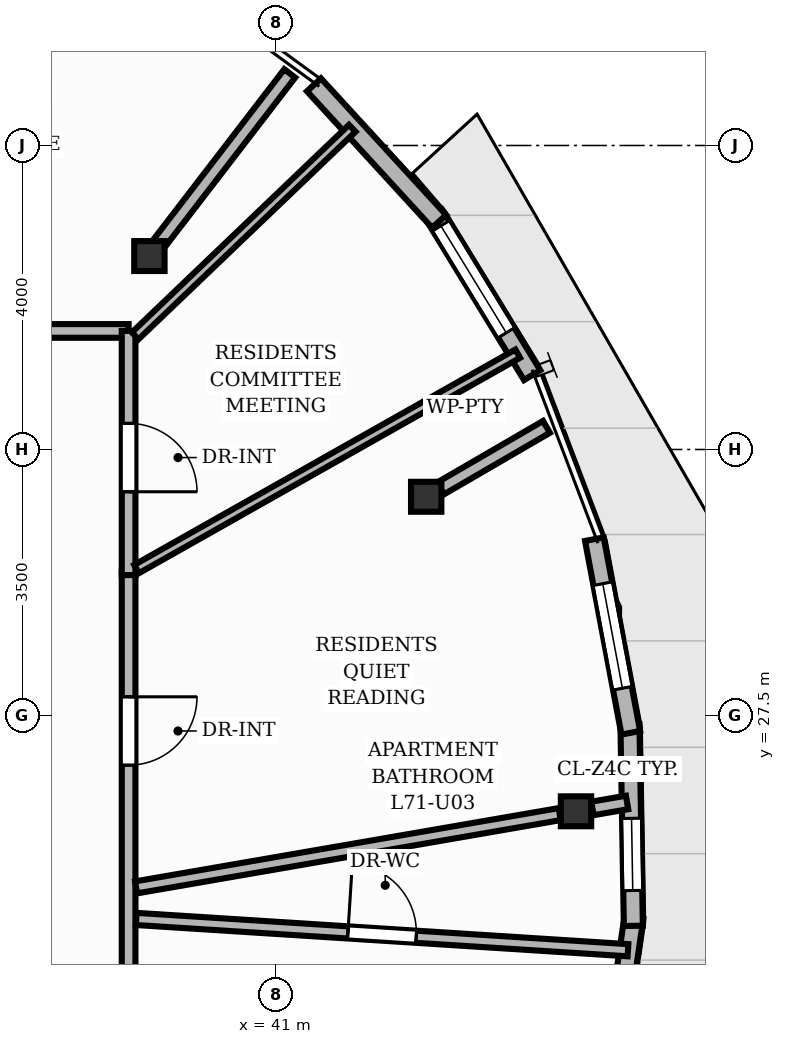
"""IFC4 building model, lengths in metres.
Left out: names, types, materials, properties, quantities, classifications, styles, units other than length and angle.
Written with IfcOpenShell. Run it as: python <this file> out.ifc"""

import sys

from ifc_helpers import new_model, si_unit, direction, frame, frame_2d, origin, origin_2d, place, context, subcontext, project, spatial, rectangle, i_section, extrude, element, fill, save


model = new_model("IFC4")
c1 = context("Model", 3, precision=1e-05, world=origin(), true_north=direction((0.0, 1.0)))
c2 = subcontext(c1, "Body", "Model", "MODEL_VIEW")
j1 = project(units=[si_unit("LENGTHUNIT", "METRE"), si_unit("PLANEANGLEUNIT", "RADIAN")], contexts=[c1])
p1 = place(None, origin())
s1 = spatial("IfcSite", under=j1, at=p1, CompositionType="ELEMENT")
p2 = place(p1, origin())
s2 = spatial("IfcBuilding", under=s1, at=p2, CompositionType="ELEMENT")
p3 = place(p2, frame((0.0, 0.0, 236.64)))
s3 = spatial("IfcBuildingStorey", under=s2, at=p3, CompositionType="ELEMENT", Elevation=236.64)
for number, where, z_axis, x_axis in (
    (1, (44.946, 26.24, 0.0), (0.0, 0.0, 1.0), (1.0, 0.0, 0.0)),
    (2, (42.975, 30.378, 0.0), (0.0, 0.0, 1.0), (1.0, 0.0, 0.0)),
    (3, (39.333, 33.545, 0.0), (0.0, 0.0, 1.0), (1.0, 0.0, 0.0)),
):
    element("IfcColumn", number, at=place(p3, frame(where, z_axis=z_axis, x_axis=x_axis)), inside=s3, PredefinedType="COLUMN", context=c2, shape_type="SweptSolid", body=[
        extrude(i_section(OverallWidth=0.399, OverallDepth=0.394, WebThickness=0.023, FlangeThickness=0.037, at=origin_2d()), origin(), (0.0, 0.0, 1.0), 3.2),
    ])
p4 = place(p3, frame((45.708, 24.842, 0.0), z_axis=(0.0, 0.0, 1.0), x_axis=(-0.144229466115, -0.989544269401, 0.0)))
e4 = element("IfcWall", 4, at=p4, inside=s3, PredefinedType="SOLIDWALL", context=c2, shape_type="SweptSolid", body=[
    extrude(rectangle(XDim=2.702, YDim=0.25, at=frame_2d((1.351, 0.0))), origin(), (0.0, 0.0, 1.0), 2.577),
])
p5 = place(p4, frame((0.651, 0.0, 0.85)))
e5 = element("IfcOpeningElement", 5, at=p5, cuts=e4, PredefinedType="OPENING", context=c2, shape_type="SweptSolid", body=[
    extrude(rectangle(XDim=1.4, YDim=1.55, at=frame_2d((0.7, 0.775))), frame((0.0, 0.135, 0.0), z_axis=(0.0, -1.0, 0.0), x_axis=(1.0, 0.0, 0.0)), (0.0, 0.0, 1.0), 0.27),
])
p6 = place(p3, frame((45.656, 27.383, 0.0), z_axis=(0.0, 0.0, 1.0), x_axis=(0.016945158089, -0.999856420501, 0.0)))
e6 = element("IfcWall", 6, at=p6, inside=s3, PredefinedType="SOLIDWALL", context=c2, shape_type="SweptSolid", body=[
    extrude(rectangle(XDim=2.651, YDim=0.25, at=frame_2d((1.326, 0.0))), origin(), (0.0, 0.0, 1.0), 2.96),
])
p7 = place(p6, frame((1.236, 0.0, 0.85)))
e7 = element("IfcOpeningElement", 7, at=p7, cuts=e6, PredefinedType="OPENING", context=c2, shape_type="SweptSolid", body=[
    extrude(rectangle(XDim=0.95, YDim=1.45, at=frame_2d((0.475, 0.725))), frame((0.0, 0.135, 0.0), z_axis=(0.0, -1.0, 0.0), x_axis=(1.0, 0.0, 0.0)), (0.0, 0.0, 1.0), 0.27),
])
p8 = place(p3, frame((45.188, 29.82, 0.0), z_axis=(0.0, 0.0, 1.0), x_axis=(0.184783228791, -0.982779302976, 0.0)))
e8 = element("IfcWall", 8, at=p8, inside=s3, PredefinedType="SOLIDWALL", context=c2, shape_type="SweptSolid", body=[
    extrude(rectangle(XDim=2.592, YDim=0.25, at=frame_2d((1.296, 0.0))), origin(), (0.0, 0.0, 1.0), 2.96),
])
p9 = place(p8, frame((0.596, 0.0, 0.85)))
e9 = element("IfcOpeningElement", 9, at=p9, cuts=e8, PredefinedType="OPENING", context=c2, shape_type="SweptSolid", body=[
    extrude(rectangle(XDim=1.4, YDim=1.55, at=frame_2d((0.7, 0.775))), frame((0.0, 0.135, 0.0), z_axis=(0.0, -1.0, 0.0), x_axis=(1.0, 0.0, 0.0)), (0.0, 0.0, 1.0), 0.27),
])
p10 = place(p3, frame((43.077, 34.093, 0.0), z_axis=(0.0, 0.0, 1.0), x_axis=(0.52150580366, -0.853247734687, 0.0)))
e10 = element("IfcWall", 10, at=p10, inside=s3, PredefinedType="SOLIDWALL", context=c2, shape_type="SweptSolid", body=[
    extrude(rectangle(XDim=2.478, YDim=0.25, at=frame_2d((1.239, 0.0))), origin(), (0.0, 0.0, 1.0), 2.96),
])
p11 = place(p10, frame((0.175, 0.0, 0.85)))
e11 = element("IfcOpeningElement", 11, at=p11, cuts=e10, PredefinedType="OPENING", context=c2, shape_type="SweptSolid", body=[
    extrude(rectangle(XDim=1.65, YDim=1.55, at=frame_2d((0.825, 0.775))), frame((0.0, 0.135, 0.0), z_axis=(0.0, -1.0, 0.0), x_axis=(1.0, 0.0, 0.0)), (0.0, 0.0, 1.0), 0.27),
])
p12 = place(p3, frame((41.499, 35.798, 0.0), z_axis=(0.0, 0.0, 1.0), x_axis=(0.675783606308, -0.737100072884, 0.0)))
e12 = element("IfcWall", 12, at=p12, inside=s3, PredefinedType="SOLIDWALL", context=c2, shape_type="SweptSolid", body=[
    extrude(rectangle(XDim=2.437, YDim=0.25, at=frame_2d((1.218, 0.0))), origin(), (0.0, 0.0, 1.0), 2.96),
])
p13 = place(p3, frame((45.163, 26.277, 0.0), z_axis=(0.0, 0.0, 1.0), x_axis=(0.985450971837, 0.169959942652, 0.0)))
e13 = element("IfcWall", 13, at=p13, inside=s3, PredefinedType="PARTITIONING", context=c2, shape_type="SweptSolid", body=[
    extrude(rectangle(XDim=0.463, YDim=0.18, at=frame_2d((0.231, 0.0))), origin(), (0.0, 0.0, 1.0), 2.404),
])
p14 = place(p3, frame((43.165, 30.488, 0.0), z_axis=(0.0, 0.0, 1.0), x_axis=(0.864591417654, 0.50247555216, 0.0)))
e14 = element("IfcWall", 14, at=p14, inside=s3, PredefinedType="PARTITIONING", context=c2, shape_type="SweptSolid", body=[
    extrude(rectangle(XDim=1.611, YDim=0.18, at=frame_2d((0.805, 0.0))), origin(), (0.0, 0.0, 1.0), 2.404),
])
p15 = place(p3, frame((39.467, 33.719, 0.0), z_axis=(0.0, 0.0, 1.0), x_axis=(0.609215330611, 0.793004842954, 0.0)))
e15 = element("IfcWall", 15, at=p15, inside=s3, PredefinedType="PARTITIONING", context=c2, shape_type="SweptSolid", body=[
    extrude(rectangle(XDim=2.811, YDim=0.18, at=frame_2d((1.405, 0.0))), origin(), (0.0, 0.0, 1.0), 2.404),
])
p16 = place(p3, frame((39.06, 29.391, 0.0), z_axis=(0.0, 0.0, 1.0), x_axis=(0.0, -1.0, 0.0)))
e16 = element("IfcWall", 16, at=p16, inside=s3, PredefinedType="PARTITIONING", context=c2, shape_type="SweptSolid", body=[
    extrude(rectangle(XDim=13.951, YDim=0.18, at=frame_2d((6.975, 0.0))), origin(), (0.0, 0.0, 1.0), 2.955),
])
p17 = place(p16, frame((5.593, 0.0, 0.0)))
e17 = element("IfcOpeningElement", 17, at=p17, cuts=e16, PredefinedType="OPENING", context=c2, shape_type="SweptSolid", body=[
    extrude(rectangle(XDim=1.05, YDim=2.15, at=frame_2d((0.525, 1.075))), frame((0.0, 0.1, 0.0), z_axis=(0.0, -1.0, 0.0), x_axis=(1.0, 0.0, 0.0)), (0.0, 0.0, 1.0), 0.2),
])
p18 = place(p16, frame((1.645, 0.0, 0.0)))
e18 = element("IfcOpeningElement", 18, at=p18, cuts=e16, PredefinedType="OPENING", context=c2, shape_type="SweptSolid", body=[
    extrude(rectangle(XDim=0.9, YDim=2.1, at=frame_2d((0.45, 1.05))), frame((0.0, 0.1, 0.0), z_axis=(0.0, -1.0, 0.0), x_axis=(1.0, 0.0, 0.0)), (0.0, 0.0, 1.0), 0.2),
])
p19 = place(p3, frame((30.572, 32.56, 0.0), z_axis=(0.0, 0.0, 1.0), x_axis=(1.0, 0.0, 0.0)))
e19 = element("IfcWall", 19, at=p19, inside=s3, PredefinedType="PARTITIONING", context=c2, shape_type="SweptSolid", body=[
    extrude(rectangle(XDim=8.489, YDim=0.18, at=frame_2d((4.244, 0.0))), origin(), (0.0, 0.0, 1.0), 2.955),
])
p20 = place(p19, frame((5.477, 0.0, 0.0)))
e20 = element("IfcOpeningElement", 20, at=p20, cuts=e19, PredefinedType="OPENING", context=c2, shape_type="SweptSolid", body=[
    extrude(rectangle(XDim=0.9, YDim=2.1, at=frame_2d((0.45, 1.05))), frame((0.0, 0.1, 0.0), z_axis=(0.0, -1.0, 0.0), x_axis=(1.0, 0.0, 0.0)), (0.0, 0.0, 1.0), 0.2),
])
p21 = place(p3, frame((39.06, 32.56, 0.0), z_axis=(0.0, 0.0, 1.0), x_axis=(0.0, -1.0, 0.0)))
e21 = element("IfcWall", 21, at=p21, inside=s3, PredefinedType="PARTITIONING", context=c2, shape_type="SweptSolid", body=[
    extrude(rectangle(XDim=3.212, YDim=0.18, at=frame_2d((1.606, 0.0))), origin(), (0.0, 0.0, 1.0), 2.955),
])
p22 = place(p21, frame((1.216, 0.0, 0.0)))
e22 = element("IfcOpeningElement", 22, at=p22, cuts=e21, PredefinedType="OPENING", context=c2, shape_type="SweptSolid", body=[
    extrude(rectangle(XDim=0.9, YDim=2.1, at=frame_2d((0.45, 1.05))), frame((0.0, 0.1, 0.0), z_axis=(0.0, -1.0, 0.0), x_axis=(1.0, 0.0, 0.0)), (0.0, 0.0, 1.0), 0.2),
])
p23 = place(p3, frame((39.16, 24.823, 0.0), z_axis=(0.0, 0.0, 1.0), x_axis=(0.997982507088, -0.063489491621, 0.0)))
e23 = element("IfcWall", 23, at=p23, inside=s3, PredefinedType="PLUMBINGWALL", context=c2, shape_type="SweptSolid", body=[
    extrude(rectangle(XDim=6.483, YDim=0.16, at=frame_2d((3.242, 0.0))), origin(), (0.0, 0.0, 1.0), 2.692),
])
p24 = place(p23, frame((2.792, 0.0, 0.0)))
e24 = element("IfcOpeningElement", 24, at=p24, cuts=e23, PredefinedType="OPENING", context=c2, shape_type="SweptSolid", body=[
    extrude(rectangle(XDim=0.9, YDim=2.1, at=frame_2d((0.45, 1.05))), frame((0.0, 0.09, 0.0), z_axis=(0.0, -1.0, 0.0), x_axis=(1.0, 0.0, 0.0)), (0.0, 0.0, 1.0), 0.18),
])
p25 = place(p3, frame((39.158, 25.238, 0.0), z_axis=(0.0, 0.0, 1.0), x_axis=(0.985360267717, 0.170485022229, 0.0)))
e25 = element("IfcWall", 25, at=p25, inside=s3, PredefinedType="PLUMBINGWALL", context=c2, shape_type="SweptSolid", body=[
    extrude(rectangle(XDim=5.656, YDim=0.16, at=frame_2d((2.828, 0.0))), origin(), (0.0, 0.0, 1.0), 2.404),
])
p26 = place(p3, frame((42.002, 35.226, 0.0), z_axis=(0.0, 0.0, 1.0), x_axis=(-0.722686135134, -0.691176352377, 0.0)))
e26 = element("IfcWall", 26, at=p26, inside=s3, PredefinedType="PARTITIONING", context=c2, shape_type="SweptSolid", body=[
    extrude(rectangle(XDim=3.951, YDim=0.125, at=frame_2d((1.976, 0.0))), origin(), (0.0, 0.0, 1.0), 2.955),
])
p27 = place(p3, frame((44.179, 32.26, 0.0), z_axis=(0.0, 0.0, 1.0), x_axis=(-0.870609410892, -0.491974850644, 0.0)))
e27 = element("IfcWall", 27, at=p27, inside=s3, PredefinedType="PARTITIONING", context=c2, shape_type="SweptSolid", body=[
    extrude(rectangle(XDim=5.76, YDim=0.125, at=frame_2d((2.88, 0.0))), origin(), (0.0, 0.0, 1.0), 2.692),
])
p28 = place(p7, origin())
e28 = element("IfcWindow", 28, at=p28, inside=s3, PartitioningType="SINGLE_PANEL", PredefinedType="WINDOW", context=c2, shape_type="SweptSolid", body=[
    extrude(rectangle(XDim=0.95, YDim=1.45, at=frame_2d((0.475, 0.725))), frame((0.0, 0.03, 0.0), z_axis=(0.0, -1.0, 0.0), x_axis=(1.0, 0.0, 0.0)), (0.0, 0.0, 1.0), 0.06),
])
fill(e7, e28)
p29 = place(p9, origin())
e29 = element("IfcWindow", 29, at=p29, inside=s3, PartitioningType="SINGLE_PANEL", PredefinedType="WINDOW", context=c2, shape_type="SweptSolid", body=[
    extrude(rectangle(XDim=1.4, YDim=1.55, at=frame_2d((0.7, 0.775))), frame((0.0, 0.03, 0.0), z_axis=(0.0, -1.0, 0.0), x_axis=(1.0, 0.0, 0.0)), (0.0, 0.0, 1.0), 0.06),
])
fill(e9, e29)
p30 = place(p11, origin())
e30 = element("IfcWindow", 30, at=p30, inside=s3, PartitioningType="SINGLE_PANEL", PredefinedType="WINDOW", context=c2, shape_type="SweptSolid", body=[
    extrude(rectangle(XDim=1.65, YDim=1.55, at=frame_2d((0.825, 0.775))), frame((0.0, 0.03, 0.0), z_axis=(0.0, -1.0, 0.0), x_axis=(1.0, 0.0, 0.0)), (0.0, 0.0, 1.0), 0.06),
])
fill(e11, e30)
p31 = place(p24, origin())
e31 = element("IfcDoor", 31, at=p31, inside=s3, OperationType="SINGLE_SWING_LEFT", PredefinedType="DOOR", context=c2, shape_type="SweptSolid", body=[
    extrude(rectangle(XDim=0.9, YDim=2.1, at=frame_2d((0.45, 1.05))), frame((0.0, 0.025, 0.0), z_axis=(0.0, -1.0, 0.0), x_axis=(1.0, 0.0, 0.0)), (0.0, 0.0, 1.0), 0.05),
])
fill(e24, e31)
p32 = place(p22, origin())
e32 = element("IfcDoor", 32, at=p32, inside=s3, OperationType="SINGLE_SWING_RIGHT", PredefinedType="DOOR", context=c2, shape_type="SweptSolid", body=[
    extrude(rectangle(XDim=0.9, YDim=2.1, at=frame_2d((0.45, 1.05))), frame((0.0, 0.025, 0.0), z_axis=(0.0, -1.0, 0.0), x_axis=(1.0, 0.0, 0.0)), (0.0, 0.0, 1.0), 0.05),
])
fill(e22, e32)
p33 = place(p18, origin())
e33 = element("IfcDoor", 33, at=p33, inside=s3, OperationType="SINGLE_SWING_LEFT", PredefinedType="DOOR", context=c2, shape_type="SweptSolid", body=[
    extrude(rectangle(XDim=0.9, YDim=2.1, at=frame_2d((0.45, 1.05))), frame((0.0, 0.025, 0.0), z_axis=(0.0, -1.0, 0.0), x_axis=(1.0, 0.0, 0.0)), (0.0, 0.0, 1.0), 0.05),
])
fill(e18, e33)
save(model, sys.argv[1])
